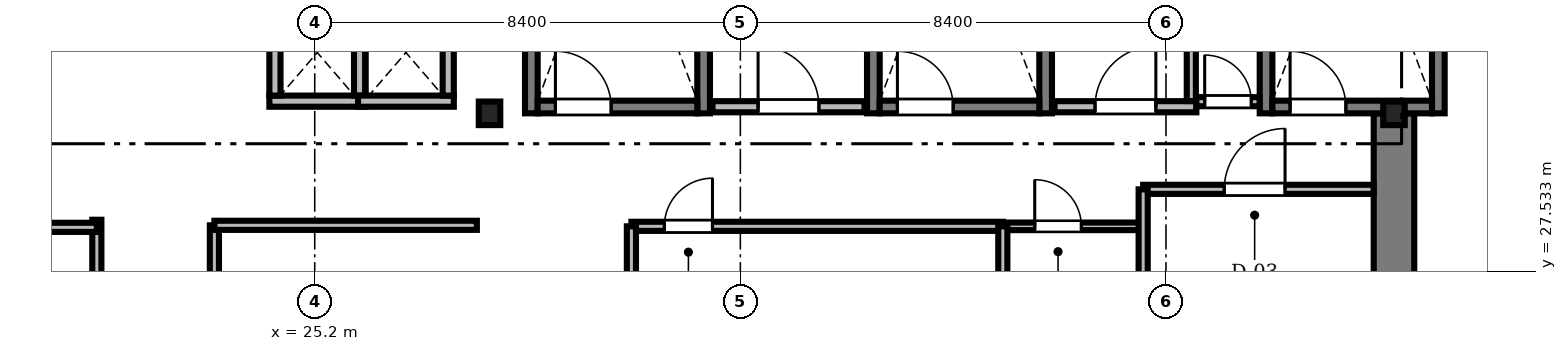
"""IFC4 building model, lengths in metres.
Left out: names, types, materials, properties, quantities, classifications, styles, units other than length and angle.
Written with IfcOpenShell. Run it as: python <this file> out.ifc"""

import sys

from ifc_helpers import new_model, si_unit, direction, frame, frame_2d, origin, origin_2d, place, context, subcontext, project, spatial, rectangle, i_section, extrude, source, transform, mapped, element, fill, save


model = new_model("IFC4")
c1 = context("Model", 3, precision=1e-05, world=origin(), true_north=direction((0.0, 1.0)))
c2 = subcontext(c1, "Body", "Model", "MODEL_VIEW")
j1 = project(units=[si_unit("LENGTHUNIT", "METRE"), si_unit("PLANEANGLEUNIT", "RADIAN")], contexts=[c1])
p1 = place(None, origin())
s1 = spatial("IfcSite", under=j1, at=p1, CompositionType="ELEMENT")
p2 = place(p1, origin())
s2 = spatial("IfcBuilding", under=s1, at=p2, CompositionType="ELEMENT")
p3 = place(p2, frame((0.0, 0.0, 140.9)))
s3 = spatial("IfcBuildingStorey", under=s2, at=p3, CompositionType="ELEMENT", Elevation=140.9)
m1 = source(origin(), c2, "Body", "SweptSolid", [
    extrude(rectangle(XDim=13.15, YDim=0.8, at=frame_2d((6.575, 0.0))), origin(), (0.0, 0.0, 1.0), 3.46),
])
p4 = place(p3, frame((46.5, 17.5, 0.0), z_axis=(0.0, 0.0, 1.0), x_axis=(0.0, 1.0, 0.0)))
e1 = element("IfcWall", 1, at=p4, inside=s3, PredefinedType="SHEAR", context=c2, shape_type="MappedRepresentation", body=[
    mapped(m1, transform((0.0, 0.0, 0.0), scale=1.0)),
])
m2 = source(origin(), c2, "Body", "SweptSolid", [
    extrude(i_section(OverallWidth=0.424, OverallDepth=0.465, WebThickness=0.035, FlangeThickness=0.056, FilletRadius=0.015, at=origin_2d()), origin(), (0.0, 0.0, 1.0), 3.46),
])
for number, where, z_axis, x_axis in (
    (2, (28.65, 30.65, 0.0), (0.0, 0.0, 1.0), (1.0, 0.0, 0.0)),
    (3, (46.5, 30.65, 0.0), (0.0, 0.0, 1.0), (1.0, 0.0, 0.0)),
):
    element("IfcColumn", number, at=place(p3, frame(where, z_axis=z_axis, x_axis=x_axis)), inside=s3, PredefinedType="COLUMN", context=c2, shape_type="MappedRepresentation", body=[
        mapped(m2, transform((0.0, 0.0, 0.0), scale=1.0)),
    ])
m3 = source(origin(), c2, "Body", "SweptSolid", [
    extrude(rectangle(XDim=9.25, YDim=0.25, at=frame_2d((4.625, 0.0))), origin(), (0.0, 0.0, 1.0), 3.5),
])
for number, where, z_axis, x_axis in (
    (4, (29.475, 30.65, 0.0), (0.0, 0.0, 1.0), (0.0, 1.0, 0.0)),
    (5, (32.875, 30.65, 0.0), (0.0, 0.0, 1.0), (0.0, 1.0, 0.0)),
):
    element("IfcWall", number, at=place(p3, frame(where, z_axis=z_axis, x_axis=x_axis)), inside=s3, PredefinedType="SOLIDWALL", context=c2, shape_type="MappedRepresentation", body=[
        mapped(m3, transform((0.0, 0.0, 0.0), scale=1.0)),
    ])
m4 = source(origin(), c2, "Body", "SweptSolid", [
    extrude(rectangle(XDim=3.15, YDim=0.25, at=frame_2d((1.575, 0.0))), origin(), (0.0, 0.0, 1.0), 3.5),
])
p5 = place(p3, frame((29.6, 30.775, 0.0), z_axis=(0.0, 0.0, 1.0), x_axis=(1.0, 0.0, 0.0)))
e6 = element("IfcWall", 6, at=p5, inside=s3, PredefinedType="SOLIDWALL", context=c2, shape_type="MappedRepresentation", body=[
    mapped(m4, transform((0.0, 0.0, 0.0), scale=1.0)),
])
m5 = source(origin(), c2, "Body", "SweptSolid", [
    extrude(rectangle(XDim=1.1, YDim=2.2, at=frame_2d((0.55, 1.1))), frame((0.0, 0.135, 0.0), z_axis=(0.0, -1.0, 0.0), x_axis=(1.0, 0.0, 0.0)), (0.0, 0.0, 1.0), 0.27),
])
p6 = place(p5, frame((0.35, 0.0, 0.0)))
e7 = element("IfcOpeningElement", 7, at=p6, cuts=e6, PredefinedType="OPENING", context=c2, shape_type="MappedRepresentation", body=[
    mapped(m5, transform((0.0, 0.0, 0.0), scale=1.0)),
])
for number, where, z_axis, x_axis in (
    (8, (36.225, 30.65, 0.0), (0.0, 0.0, 1.0), (0.0, 1.0, 0.0)),
    (9, (39.625, 30.65, 0.0), (0.0, 0.0, 1.0), (0.0, 1.0, 0.0)),
):
    element("IfcWall", number, at=place(p3, frame(where, z_axis=z_axis, x_axis=x_axis)), inside=s3, PredefinedType="SOLIDWALL", context=c2, shape_type="MappedRepresentation", body=[
        mapped(m3, transform((0.0, 0.0, 0.0), scale=1.0)),
    ])
p7 = place(p3, frame((36.35, 30.775, 0.0), z_axis=(0.0, 0.0, 1.0), x_axis=(1.0, 0.0, 0.0)))
e10 = element("IfcWall", 10, at=p7, inside=s3, PredefinedType="SOLIDWALL", context=c2, shape_type="MappedRepresentation", body=[
    mapped(m4, transform((0.0, 0.0, 0.0), scale=1.0)),
])
p8 = place(p7, frame((0.35, 0.0, 0.0)))
e11 = element("IfcOpeningElement", 11, at=p8, cuts=e10, PredefinedType="OPENING", context=c2, shape_type="MappedRepresentation", body=[
    mapped(m5, transform((0.0, 0.0, 0.0), scale=1.0)),
])
for number, where, z_axis, x_axis in (
    (12, (43.975, 30.65, 0.0), (0.0, 0.0, 1.0), (0.0, 1.0, 0.0)),
    (13, (47.375, 30.65, 0.0), (0.0, 0.0, 1.0), (0.0, 1.0, 0.0)),
):
    element("IfcWall", number, at=place(p3, frame(where, z_axis=z_axis, x_axis=x_axis)), inside=s3, PredefinedType="SOLIDWALL", context=c2, shape_type="MappedRepresentation", body=[
        mapped(m3, transform((0.0, 0.0, 0.0), scale=1.0)),
    ])
p9 = place(p3, frame((44.1, 30.775, 0.0), z_axis=(0.0, 0.0, 1.0), x_axis=(1.0, 0.0, 0.0)))
e14 = element("IfcWall", 14, at=p9, inside=s3, PredefinedType="SOLIDWALL", context=c2, shape_type="MappedRepresentation", body=[
    mapped(m4, transform((0.0, 0.0, 0.0), scale=1.0)),
])
p10 = place(p9, frame((0.35, 0.0, 0.0)))
e15 = element("IfcOpeningElement", 15, at=p10, cuts=e14, PredefinedType="OPENING", context=c2, shape_type="MappedRepresentation", body=[
    mapped(m5, transform((0.0, 0.0, 0.0), scale=1.0)),
])
m6 = source(origin(), c2, "Body", "SweptSolid", [
    extrude(rectangle(XDim=3.0, YDim=0.22, at=frame_2d((1.5, 0.0))), origin(), (0.0, 0.0, 1.0), 3.46),
])
p11 = place(p3, frame((33.05, 30.78, 0.0), z_axis=(0.0, 0.0, 1.0), x_axis=(1.0, 0.0, 0.0)))
e16 = element("IfcWall", 16, at=p11, inside=s3, PredefinedType="SOLIDWALL", context=c2, shape_type="MappedRepresentation", body=[
    mapped(m6, transform((0.0, 0.0, 0.0), scale=1.0)),
])
m7 = source(origin(), c2, "Body", "SweptSolid", [
    extrude(rectangle(XDim=1.2, YDim=2.2, at=frame_2d((0.6, 1.1))), frame((0.0, 0.12, 0.0), z_axis=(0.0, -1.0, 0.0), x_axis=(1.0, 0.0, 0.0)), (0.0, 0.0, 1.0), 0.24),
])
p12 = place(p11, frame((0.9, 0.0, 0.0)))
e17 = element("IfcOpeningElement", 17, at=p12, cuts=e16, PredefinedType="OPENING", context=c2, shape_type="MappedRepresentation", body=[
    mapped(m7, transform((0.0, 0.0, 0.0), scale=1.0)),
])
m8 = source(origin(), c2, "Body", "SweptSolid", [
    extrude(rectangle(XDim=2.8, YDim=0.22, at=frame_2d((1.4, 0.0))), origin(), (0.0, 0.0, 1.0), 3.46),
])
p13 = place(p3, frame((39.8, 30.78, 0.0), z_axis=(0.0, 0.0, 1.0), x_axis=(1.0, 0.0, 0.0)))
e18 = element("IfcWall", 18, at=p13, inside=s3, PredefinedType="SOLIDWALL", context=c2, shape_type="MappedRepresentation", body=[
    mapped(m8, transform((0.0, 0.0, 0.0), scale=1.0)),
])
p14 = place(p13, frame((0.8, 0.0, 0.0)))
e19 = element("IfcOpeningElement", 19, at=p14, cuts=e18, PredefinedType="OPENING", context=c2, shape_type="MappedRepresentation", body=[
    mapped(m7, transform((0.0, 0.0, 0.0), scale=1.0)),
])
m9 = source(origin(), c2, "Body", "SweptSolid", [
    extrude(rectangle(XDim=1.89, YDim=0.22, at=frame_2d((0.945, 0.0))), origin(), (0.0, 0.0, 1.0), 3.46),
])
p15 = place(p3, frame((24.305, 30.89, 0.0), z_axis=(0.0, 0.0, 1.0), x_axis=(1.0, 0.0, 0.0)))
e20 = element("IfcWall", 20, at=p15, inside=s3, PredefinedType="SOLIDWALL", context=c2, shape_type="MappedRepresentation", body=[
    mapped(m9, transform((0.0, 0.0, 0.0), scale=1.0)),
])
m10 = source(origin(), c2, "Body", "SweptSolid", [
    extrude(rectangle(XDim=1.7, YDim=0.22, at=frame_2d((0.85, 0.0))), origin(), (0.0, 0.0, 1.0), 3.46),
])
for number, where, z_axis, x_axis in (
    (21, (24.415, 31.0, 0.0), (0.0, 0.0, 1.0), (0.0, 1.0, 0.0)),
    (22, (26.085, 31.0, 0.0), (0.0, 0.0, 1.0), (0.0, 1.0, 0.0)),
):
    element("IfcWall", number, at=place(p3, frame(where, z_axis=z_axis, x_axis=x_axis)), inside=s3, PredefinedType="SOLIDWALL", context=c2, shape_type="MappedRepresentation", body=[
        mapped(m10, transform((0.0, 0.0, 0.0), scale=1.0)),
    ])
p16 = place(p3, frame((26.055, 30.89, 0.0), z_axis=(0.0, 0.0, 1.0), x_axis=(1.0, 0.0, 0.0)))
e23 = element("IfcWall", 23, at=p16, inside=s3, PredefinedType="SOLIDWALL", context=c2, shape_type="MappedRepresentation", body=[
    mapped(m9, transform((0.0, 0.0, 0.0), scale=1.0)),
])
p17 = place(p3, frame((27.835, 31.0, 0.0), z_axis=(0.0, 0.0, 1.0), x_axis=(0.0, 1.0, 0.0)))
e24 = element("IfcWall", 24, at=p17, inside=s3, PredefinedType="SOLIDWALL", context=c2, shape_type="MappedRepresentation", body=[
    mapped(m10, transform((0.0, 0.0, 0.0), scale=1.0)),
])
m11 = source(origin(), c2, "Body", "SweptSolid", [
    extrude(rectangle(XDim=14.15, YDim=0.18, at=frame_2d((7.075, 0.0))), origin(), (0.0, 0.0, 1.0), 2.852),
])
p18 = place(p3, frame((20.9, 14.4, 0.0), z_axis=(0.0, 0.0, 1.0), x_axis=(0.0, 1.0, 0.0)))
e25 = element("IfcWall", 25, at=p18, inside=s3, PredefinedType="PARTITIONING", context=c2, shape_type="MappedRepresentation", body=[
    mapped(m11, transform((0.0, 0.0, 0.0), scale=1.0)),
])
m12 = source(origin(), c2, "Body", "SweptSolid", [
    extrude(rectangle(XDim=1.05, YDim=2.2, at=frame_2d((0.525, 1.1))), frame((0.0, 0.1, 0.0), z_axis=(0.0, -1.0, 0.0), x_axis=(1.0, 0.0, 0.0)), (0.0, 0.0, 1.0), 0.2),
])
p19 = place(p18, frame((1.813, 0.0, 0.0)))
e26 = element("IfcOpeningElement", 26, at=p19, cuts=e25, PredefinedType="OPENING", context=c2, shape_type="MappedRepresentation", body=[
    mapped(m12, transform((0.0, 0.0, 0.0), scale=1.0)),
])
m13 = source(origin(), c2, "Body", "SweptSolid", [
    extrude(rectangle(XDim=0.95, YDim=2.15, at=frame_2d((0.475, 1.075))), frame((0.0, 0.1, 0.0), z_axis=(0.0, -1.0, 0.0), x_axis=(1.0, 0.0, 0.0)), (0.0, 0.0, 1.0), 0.2),
])
p20 = place(p18, frame((7.705, 0.0, 0.0)))
e27 = element("IfcOpeningElement", 27, at=p20, cuts=e25, PredefinedType="OPENING", context=c2, shape_type="MappedRepresentation", body=[
    mapped(m13, transform((0.0, 0.0, 0.0), scale=1.0)),
])
p21 = place(p18, frame((11.146, 0.0, 0.0)))
e28 = element("IfcOpeningElement", 28, at=p21, cuts=e25, PredefinedType="OPENING", context=c2, shape_type="MappedRepresentation", body=[
    mapped(m12, transform((0.0, 0.0, 0.0), scale=1.0)),
])
m14 = source(origin(), c2, "Body", "SweptSolid", [
    extrude(rectangle(XDim=11.94, YDim=0.18, at=frame_2d((5.97, 0.0))), origin(), (0.0, 0.0, 1.0), 2.852),
])
p22 = place(p3, frame((23.22, 16.5, 0.0), z_axis=(0.0, 0.0, 1.0), x_axis=(0.0, 1.0, 0.0)))
e29 = element("IfcWall", 29, at=p22, inside=s3, PredefinedType="PARTITIONING", context=c2, shape_type="MappedRepresentation", body=[
    mapped(m14, transform((0.0, 0.0, 0.0), scale=1.0)),
])
p23 = place(p22, frame((4.5, 0.0, 0.0)))
e30 = element("IfcOpeningElement", 30, at=p23, cuts=e29, PredefinedType="OPENING", context=c2, shape_type="MappedRepresentation", body=[
    mapped(m12, transform((0.0, 0.0, 0.0), scale=1.0)),
])
m15 = source(origin(), c2, "Body", "SweptSolid", [
    extrude(rectangle(XDim=7.33, YDim=0.18, at=frame_2d((3.665, 0.0))), origin(), (0.0, 0.0, 1.0), 3.092),
])
p24 = place(p3, frame((31.45, 28.42, 0.0), z_axis=(0.0, 0.0, 1.0), x_axis=(1.0, 0.0, 0.0)))
e31 = element("IfcWall", 31, at=p24, inside=s3, PredefinedType="PARTITIONING", context=c2, shape_type="MappedRepresentation", body=[
    mapped(m15, transform((0.0, 0.0, 0.0), scale=1.0)),
])
p25 = place(p24, frame((0.65, 0.0, 0.0)))
e32 = element("IfcOpeningElement", 32, at=p25, cuts=e31, PredefinedType="OPENING", context=c2, shape_type="MappedRepresentation", body=[
    mapped(m13, transform((0.0, 0.0, 0.0), scale=1.0)),
])
m16 = source(origin(), c2, "Body", "SweptSolid", [
    extrude(rectangle(XDim=4.548, YDim=0.18, at=frame_2d((2.274, 0.0))), origin(), (0.0, 0.0, 1.0), 3.092),
])
p26 = place(p3, frame((41.55, 29.15, 0.0), z_axis=(0.0, 0.0, 1.0), x_axis=(1.0, 0.0, 0.0)))
e33 = element("IfcWall", 33, at=p26, inside=s3, PredefinedType="PARTITIONING", context=c2, shape_type="MappedRepresentation", body=[
    mapped(m16, transform((0.0, 0.0, 0.0), scale=1.0)),
])
m17 = source(origin(), c2, "Body", "SweptSolid", [
    extrude(rectangle(XDim=1.2, YDim=2.2, at=frame_2d((0.6, 1.1))), frame((0.0, 0.1, 0.0), z_axis=(0.0, -1.0, 0.0), x_axis=(1.0, 0.0, 0.0)), (0.0, 0.0, 1.0), 0.2),
])
p27 = place(p26, frame((1.6, 0.0, 0.0)))
e34 = element("IfcOpeningElement", 34, at=p27, cuts=e33, PredefinedType="OPENING", context=c2, shape_type="MappedRepresentation", body=[
    mapped(m17, transform((0.0, 0.0, 0.0), scale=1.0)),
])
m18 = source(origin(), c2, "Body", "SweptSolid", [
    extrude(rectangle(XDim=2.74, YDim=0.15, at=frame_2d((1.37, 0.0))), origin(), (0.0, 0.0, 1.0), 3.46),
])
p28 = place(p3, frame((38.78, 28.42, 0.0), z_axis=(0.0, 0.0, 1.0), x_axis=(1.0, 0.0, 0.0)))
e35 = element("IfcWall", 35, at=p28, inside=s3, PredefinedType="PARTITIONING", context=c2, shape_type="MappedRepresentation", body=[
    mapped(m18, transform((0.0, 0.0, 0.0), scale=1.0)),
])
m19 = source(origin(), c2, "Body", "SweptSolid", [
    extrude(rectangle(XDim=0.92, YDim=2.1, at=frame_2d((0.46, 1.05))), frame((0.0, 0.085, 0.0), z_axis=(0.0, -1.0, 0.0), x_axis=(1.0, 0.0, 0.0)), (0.0, 0.0, 1.0), 0.17),
])
p29 = place(p28, frame((0.63, 0.0, 0.0)))
e36 = element("IfcOpeningElement", 36, at=p29, cuts=e35, PredefinedType="OPENING", context=c2, shape_type="MappedRepresentation", body=[
    mapped(m19, transform((0.0, 0.0, 0.0), scale=1.0)),
])
m20 = source(origin(), c2, "Body", "SweptSolid", [
    extrude(rectangle(XDim=1.248, YDim=0.18, at=frame_2d((0.624, 0.0))), origin(), (0.0, 0.0, 1.0), 3.46),
])
p30 = place(p3, frame((42.6, 30.88, 0.0), z_axis=(0.0, 0.0, 1.0), x_axis=(1.0, 0.0, 0.0)))
e37 = element("IfcWall", 37, at=p30, inside=s3, PredefinedType="PARTITIONING", context=c2, shape_type="MappedRepresentation", body=[
    mapped(m20, transform((0.0, 0.0, 0.0), scale=1.0)),
])
m21 = source(origin(), c2, "Body", "SweptSolid", [
    extrude(rectangle(XDim=0.92, YDim=2.1, at=frame_2d((0.46, 1.05))), frame((0.0, 0.1, 0.0), z_axis=(0.0, -1.0, 0.0), x_axis=(1.0, 0.0, 0.0)), (0.0, 0.0, 1.0), 0.2),
])
p31 = place(p30, frame((0.164, 0.0, 0.0)))
e38 = element("IfcOpeningElement", 38, at=p31, cuts=e37, PredefinedType="OPENING", context=c2, shape_type="MappedRepresentation", body=[
    mapped(m21, transform((0.0, 0.0, 0.0), scale=1.0)),
])
m22 = source(origin(), c2, "Body", "SweptSolid", [
    extrude(rectangle(XDim=14.17, YDim=0.18, at=frame_2d((7.085, 0.0))), origin(), (0.0, 0.0, 1.0), 2.702),
])
p32 = place(p3, frame((6.73, 28.4, 0.0), z_axis=(0.0, 0.0, 1.0), x_axis=(1.0, 0.0, 0.0)))
e39 = element("IfcWall", 39, at=p32, inside=s3, PredefinedType="PARTITIONING", context=c2, shape_type="MappedRepresentation", body=[
    mapped(m22, transform((0.0, 0.0, 0.0), scale=1.0)),
])
m23 = source(origin(), c2, "Body", "SweptSolid", [
    extrude(rectangle(XDim=5.18, YDim=0.18, at=frame_2d((2.59, 0.0))), origin(), (0.0, 0.0, 1.0), 3.46),
])
p33 = place(p3, frame((23.22, 28.44, 0.0), z_axis=(0.0, 0.0, 1.0), x_axis=(1.0, 0.0, 0.0)))
e40 = element("IfcWall", 40, at=p33, inside=s3, PredefinedType="PARTITIONING", context=c2, shape_type="MappedRepresentation", body=[
    mapped(m23, transform((0.0, 0.0, 0.0), scale=1.0)),
])
m24 = source(origin(), c2, "Body", "SweptSolid", [
    extrude(rectangle(XDim=2.758, YDim=0.18, at=frame_2d((1.379, 0.0))), origin(), (0.0, 0.0, 1.0), 3.46),
])
p34 = place(p3, frame((42.5, 30.892, 0.0), z_axis=(0.0, 0.0, 1.0), x_axis=(0.0, 1.0, 0.0)))
e41 = element("IfcWall", 41, at=p34, inside=s3, PredefinedType="PARTITIONING", context=c2, shape_type="MappedRepresentation", body=[
    mapped(m24, transform((0.0, 0.0, 0.0), scale=1.0)),
])
m25 = source(origin(), c2, "Body", "SweptSolid", [
    extrude(rectangle(XDim=2.35, YDim=0.18, at=frame_2d((1.175, 0.0))), origin(), (0.0, 0.0, 1.0), 2.852),
])
p35 = place(p3, frame((41.55, 26.8, 0.0), z_axis=(0.0, 0.0, 1.0), x_axis=(0.0, 1.0, 0.0)))
e42 = element("IfcWall", 42, at=p35, inside=s3, PredefinedType="PARTITIONING", context=c2, shape_type="MappedRepresentation", body=[
    mapped(m25, transform((0.0, 0.0, 0.0), scale=1.0)),
])
m26 = source(origin(), c2, "Body", "SweptSolid", [
    extrude(rectangle(XDim=1.6, YDim=0.18, at=frame_2d((0.8, 0.0))), origin(), (0.0, 0.0, 1.0), 3.002),
])
for number, where, z_axis, x_axis in (
    (43, (31.45, 26.82, 0.0), (0.0, 0.0, 1.0), (0.0, 1.0, 0.0)),
    (44, (38.78, 26.82, 0.0), (0.0, 0.0, 1.0), (0.0, 1.0, 0.0)),
):
    element("IfcWall", number, at=place(p3, frame(where, z_axis=z_axis, x_axis=x_axis)), inside=s3, PredefinedType="PARTITIONING", context=c2, shape_type="MappedRepresentation", body=[
        mapped(m26, transform((0.0, 0.0, 0.0), scale=1.0)),
    ])
m27 = source(origin(), c2, "Body", "SweptSolid", [
    extrude(rectangle(XDim=1.1, YDim=2.2, at=frame_2d((0.55, 1.1))), frame((0.0, 0.025, 0.0), z_axis=(0.0, -1.0, 0.0), x_axis=(1.0, 0.0, 0.0)), (0.0, 0.0, 1.0), 0.05),
])
p36 = place(p6, origin())
e45 = element("IfcDoor", 45, at=p36, inside=s3, OperationType="SINGLE_SWING_LEFT", PredefinedType="DOOR", context=c2, shape_type="MappedRepresentation", body=[
    mapped(m27, transform((0.0, 0.0, 0.0), scale=1.0)),
])
fill(e7, e45)
p37 = place(p8, origin())
e46 = element("IfcDoor", 46, at=p37, inside=s3, OperationType="SINGLE_SWING_LEFT", PredefinedType="DOOR", context=c2, shape_type="MappedRepresentation", body=[
    mapped(m27, transform((0.0, 0.0, 0.0), scale=1.0)),
])
fill(e11, e46)
p38 = place(p10, origin())
e47 = element("IfcDoor", 47, at=p38, inside=s3, OperationType="SINGLE_SWING_LEFT", PredefinedType="DOOR", context=c2, shape_type="MappedRepresentation", body=[
    mapped(m27, transform((0.0, 0.0, 0.0), scale=1.0)),
])
fill(e15, e47)
m28 = source(origin(), c2, "Body", "SweptSolid", [
    extrude(rectangle(XDim=1.2, YDim=2.2, at=frame_2d((0.6, 1.1))), frame((0.0, 0.025, 0.0), z_axis=(0.0, -1.0, 0.0), x_axis=(1.0, 0.0, 0.0)), (0.0, 0.0, 1.0), 0.05),
])
p39 = place(p12, origin())
e48 = element("IfcDoor", 48, at=p39, inside=s3, OperationType="SINGLE_SWING_LEFT", PredefinedType="DOOR", context=c2, shape_type="MappedRepresentation", body=[
    mapped(m28, transform((0.0, 0.0, 0.0), scale=1.0)),
])
fill(e17, e48)
p40 = place(p14, origin())
e49 = element("IfcDoor", 49, at=p40, inside=s3, OperationType="SINGLE_SWING_RIGHT", PredefinedType="DOOR", context=c2, shape_type="MappedRepresentation", body=[
    mapped(m28, transform((0.0, 0.0, 0.0), scale=1.0)),
])
fill(e19, e49)
m29 = source(origin(), c2, "Body", "SweptSolid", [
    extrude(rectangle(XDim=0.95, YDim=2.15, at=frame_2d((0.475, 1.075))), frame((0.0, 0.025, 0.0), z_axis=(0.0, -1.0, 0.0), x_axis=(1.0, 0.0, 0.0)), (0.0, 0.0, 1.0), 0.05),
])
p41 = place(p25, origin())
e50 = element("IfcDoor", 50, at=p41, inside=s3, OperationType="SINGLE_SWING_RIGHT", PredefinedType="DOOR", context=c2, shape_type="MappedRepresentation", body=[
    mapped(m29, transform((0.0, 0.0, 0.0), scale=1.0)),
])
fill(e32, e50)
p42 = place(p27, origin())
e51 = element("IfcDoor", 51, at=p42, inside=s3, OperationType="SINGLE_SWING_RIGHT", PredefinedType="DOOR", context=c2, shape_type="MappedRepresentation", body=[
    mapped(m28, transform((0.0, 0.0, 0.0), scale=1.0)),
])
fill(e34, e51)
m30 = source(origin(), c2, "Body", "SweptSolid", [
    extrude(rectangle(XDim=0.92, YDim=2.1, at=frame_2d((0.46, 1.05))), frame((0.0, 0.025, 0.0), z_axis=(0.0, -1.0, 0.0), x_axis=(1.0, 0.0, 0.0)), (0.0, 0.0, 1.0), 0.05),
])
p43 = place(p29, origin())
e52 = element("IfcDoor", 52, at=p43, inside=s3, OperationType="SINGLE_SWING_LEFT", PredefinedType="DOOR", context=c2, shape_type="MappedRepresentation", body=[
    mapped(m30, transform((0.0, 0.0, 0.0), scale=1.0)),
])
fill(e36, e52)
p44 = place(p31, origin())
e53 = element("IfcDoor", 53, at=p44, inside=s3, OperationType="SINGLE_SWING_LEFT", PredefinedType="DOOR", context=c2, shape_type="MappedRepresentation", body=[
    mapped(m30, transform((0.0, 0.0, 0.0), scale=1.0)),
])
fill(e38, e53)
save(model, sys.argv[1])
